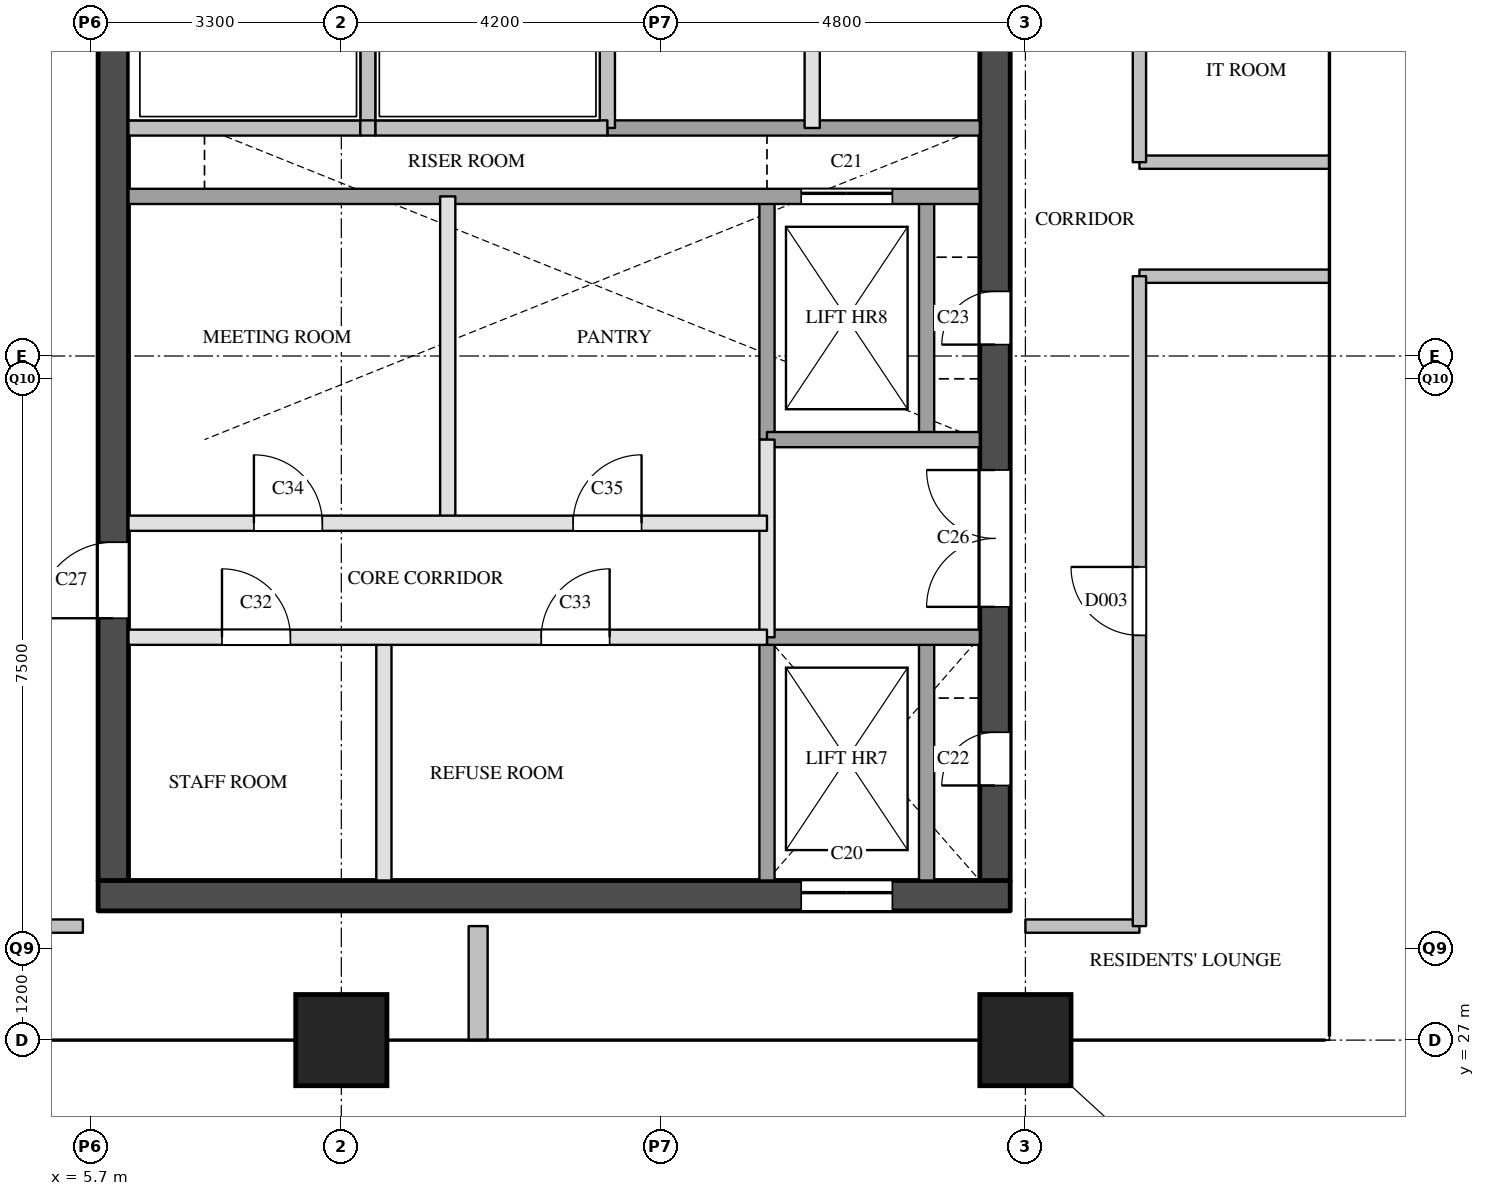
"""IFC4 building model, lengths in metres.
Left out: names, types, materials, properties, quantities, classifications, styles, units other than length and angle.
Written with IfcOpenShell. Run it as: python <this file> out.ifc"""

import sys

from ifc_helpers import new_model, si_unit, direction, frame, frame_2d, origin, origin_2d, place, context, subcontext, project, spatial, rectangle, extrude, element, fill, save


model = new_model("IFC4")
c1 = context("Model", 3, precision=1e-05, world=origin(), true_north=direction((0.0, 1.0)))
c2 = subcontext(c1, "Body", "Model", "MODEL_VIEW")
j1 = project(units=[si_unit("LENGTHUNIT", "METRE"), si_unit("PLANEANGLEUNIT", "RADIAN")], contexts=[c1])
p1 = place(None, origin())
s1 = spatial("IfcSite", under=j1, at=p1, CompositionType="ELEMENT")
p2 = place(p1, origin())
s2 = spatial("IfcBuilding", under=s1, at=p2, CompositionType="ELEMENT")
p3 = place(p2, frame((0.0, 0.0, 207.2)))
s3 = spatial("IfcBuildingStorey", under=s2, at=p3, CompositionType="ELEMENT", Elevation=207.2)
for number, where, z_axis, x_axis in (
    (1, (9.0, 27.0, 0.0), (0.0, 0.0, 1.0), (1.0, 0.0, 0.0)),
    (2, (18.0, 27.0, 0.0), (0.0, 0.0, 1.0), (1.0, 0.0, 0.0)),
):
    element("IfcColumn", number, at=place(p3, frame(where, z_axis=z_axis, x_axis=x_axis)), inside=s3, PredefinedType="COLUMN", context=c2, shape_type="SweptSolid", body=[
        extrude(rectangle(XDim=1.2, YDim=1.2, at=origin_2d()), origin(), (0.0, 0.0, 1.0), 3.9),
    ])
p4 = place(p3, frame((5.8, 28.9, 0.0), z_axis=(0.0, 0.0, 1.0), x_axis=(1.0, 0.0, 0.0)))
e3 = element("IfcWall", 3, at=p4, inside=s3, PredefinedType="SHEAR", context=c2, shape_type="SweptSolid", body=[
    extrude(rectangle(XDim=12.0, YDim=0.4, at=frame_2d((6.0, 0.0))), origin(), (0.0, 0.0, 1.0), 3.6),
])
p5 = place(p4, frame((9.25, 0.0, 0.0)))
e4 = element("IfcOpeningElement", 4, at=p5, cuts=e3, PredefinedType="OPENING", context=c2, shape_type="SweptSolid", body=[
    extrude(rectangle(XDim=1.2, YDim=2.1, at=frame_2d((0.6, 1.05))), frame((0.0, 0.21, 0.0), z_axis=(0.0, -1.0, 0.0), x_axis=(1.0, 0.0, 0.0)), (0.0, 0.0, 1.0), 0.42),
])
p6 = place(p3, frame((6.0, 29.1, 0.0), z_axis=(0.0, 0.0, 1.0), x_axis=(0.0, 1.0, 0.0)))
e5 = element("IfcWall", 5, at=p6, inside=s3, PredefinedType="SHEAR", context=c2, shape_type="SweptSolid", body=[
    extrude(rectangle(XDim=20.3, YDim=0.4, at=frame_2d((10.15, 0.0))), origin(), (0.0, 0.0, 1.0), 3.6),
])
p7 = place(p6, frame((3.45, 0.0, 0.0)))
e6 = element("IfcOpeningElement", 6, at=p7, cuts=e5, PredefinedType="OPENING", context=c2, shape_type="SweptSolid", body=[
    extrude(rectangle(XDim=1.0, YDim=2.1, at=frame_2d((0.5, 1.05))), frame((0.0, 0.21, 0.0), z_axis=(0.0, -1.0, 0.0), x_axis=(1.0, 0.0, 0.0)), (0.0, 0.0, 1.0), 0.42),
])
p8 = place(p6, frame((16.4, 0.0, 0.0)))
e7 = element("IfcOpeningElement", 7, at=p8, cuts=e5, PredefinedType="OPENING", context=c2, shape_type="SweptSolid", body=[
    extrude(rectangle(XDim=1.0, YDim=2.1, at=frame_2d((0.5, 1.05))), frame((0.0, 0.21, 0.0), z_axis=(0.0, -1.0, 0.0), x_axis=(1.0, 0.0, 0.0)), (0.0, 0.0, 1.0), 0.42),
])
p9 = place(p3, frame((17.6, 29.1, 0.0), z_axis=(0.0, 0.0, 1.0), x_axis=(0.0, 1.0, 0.0)))
e8 = element("IfcWall", 8, at=p9, inside=s3, PredefinedType="SHEAR", context=c2, shape_type="SweptSolid", body=[
    extrude(rectangle(XDim=20.3, YDim=0.4, at=frame_2d((10.15, 0.0))), origin(), (0.0, 0.0, 1.0), 3.6),
])
p10 = place(p9, frame((1.25, 0.0, 0.0)))
e9 = element("IfcOpeningElement", 9, at=p10, cuts=e8, PredefinedType="OPENING", context=c2, shape_type="SweptSolid", body=[
    extrude(rectangle(XDim=0.7, YDim=2.1, at=frame_2d((0.35, 1.05))), frame((0.0, 0.21, 0.0), z_axis=(0.0, -1.0, 0.0), x_axis=(1.0, 0.0, 0.0)), (0.0, 0.0, 1.0), 0.42),
])
p11 = place(p9, frame((7.05, 0.0, 0.0)))
e10 = element("IfcOpeningElement", 10, at=p11, cuts=e8, PredefinedType="OPENING", context=c2, shape_type="SweptSolid", body=[
    extrude(rectangle(XDim=0.7, YDim=2.1, at=frame_2d((0.35, 1.05))), frame((0.0, 0.21, 0.0), z_axis=(0.0, -1.0, 0.0), x_axis=(1.0, 0.0, 0.0)), (0.0, 0.0, 1.0), 0.42),
])
p12 = place(p9, frame((3.6, 0.0, 0.0)))
e11 = element("IfcOpeningElement", 11, at=p12, cuts=e8, PredefinedType="OPENING", context=c2, shape_type="SweptSolid", body=[
    extrude(rectangle(XDim=1.8, YDim=2.1, at=frame_2d((0.9, 1.05))), frame((0.0, 0.21, 0.0), z_axis=(0.0, -1.0, 0.0), x_axis=(1.0, 0.0, 0.0)), (0.0, 0.0, 1.0), 0.42),
])
p13 = place(p3, frame((9.35, 39.0, 0.0), z_axis=(0.0, 0.0, 1.0), x_axis=(0.0, 1.0, 0.0)))
e12 = element("IfcWall", 12, at=p13, inside=s3, PredefinedType="SOLIDWALL", context=c2, shape_type="SweptSolid", body=[
    extrude(rectangle(XDim=1.9, YDim=0.2, at=frame_2d((0.95, 0.0))), origin(), (0.0, 0.0, 1.0), 3.6),
])
p14 = place(p3, frame((9.56, 29.1, 0.0), z_axis=(0.0, 0.0, 1.0), x_axis=(0.0, 1.0, 0.0)))
e13 = element("IfcWall", 13, at=p14, inside=s3, PredefinedType="PARTITIONING", context=c2, shape_type="SweptSolid", body=[
    extrude(rectangle(XDim=3.2, YDim=0.2, at=frame_2d((1.6, 0.0))), origin(), (0.0, 0.0, 1.0), 3.6),
])
p15 = place(p3, frame((10.4, 33.8, 0.0), z_axis=(0.0, 0.0, 1.0), x_axis=(0.0, 1.0, 0.0)))
e14 = element("IfcWall", 14, at=p15, inside=s3, PredefinedType="PARTITIONING", context=c2, shape_type="SweptSolid", body=[
    extrude(rectangle(XDim=4.3, YDim=0.2, at=frame_2d((2.15, 0.0))), origin(), (0.0, 0.0, 1.0), 3.6),
])
p16 = place(p3, frame((12.5, 39.0, 0.0), z_axis=(0.0, 0.0, 1.0), x_axis=(0.0, 1.0, 0.0)))
e15 = element("IfcWall", 15, at=p16, inside=s3, PredefinedType="SOLIDWALL", context=c2, shape_type="SweptSolid", body=[
    extrude(rectangle(XDim=1.9, YDim=0.2, at=frame_2d((0.95, 0.0))), origin(), (0.0, 0.0, 1.0), 3.6),
])
p17 = place(p3, frame((14.6, 32.3, 0.0), z_axis=(0.0, 0.0, 1.0), x_axis=(0.0, 1.0, 0.0)))
e16 = element("IfcWall", 16, at=p17, inside=s3, PredefinedType="PARTITIONING", context=c2, shape_type="SweptSolid", body=[
    extrude(rectangle(XDim=2.6, YDim=0.2, at=frame_2d((1.3, 0.0))), origin(), (0.0, 0.0, 1.0), 3.6),
])
p18 = place(p3, frame((14.6, 29.1, 0.0), z_axis=(0.0, 0.0, 1.0), x_axis=(0.0, 1.0, 0.0)))
e17 = element("IfcWall", 17, at=p18, inside=s3, PredefinedType="SOLIDWALL", context=c2, shape_type="SweptSolid", body=[
    extrude(rectangle(XDim=3.2, YDim=0.2, at=frame_2d((1.6, 0.0))), origin(), (0.0, 0.0, 1.0), 3.6),
])
p19 = place(p3, frame((14.6, 34.9, 0.0), z_axis=(0.0, 0.0, 1.0), x_axis=(0.0, 1.0, 0.0)))
e18 = element("IfcWall", 18, at=p19, inside=s3, PredefinedType="SOLIDWALL", context=c2, shape_type="SweptSolid", body=[
    extrude(rectangle(XDim=3.2, YDim=0.2, at=frame_2d((1.6, 0.0))), origin(), (0.0, 0.0, 1.0), 3.6),
])
p20 = place(p3, frame((15.195, 39.0, 0.0), z_axis=(0.0, 0.0, 1.0), x_axis=(0.0, 1.0, 0.0)))
e19 = element("IfcWall", 19, at=p20, inside=s3, PredefinedType="PARTITIONING", context=c2, shape_type="SweptSolid", body=[
    extrude(rectangle(XDim=6.2, YDim=0.2, at=frame_2d((3.1, 0.0))), origin(), (0.0, 0.0, 1.0), 3.6),
])
p21 = place(p3, frame((16.7, 29.1, 0.0), z_axis=(0.0, 0.0, 1.0), x_axis=(0.0, 1.0, 0.0)))
e20 = element("IfcWall", 20, at=p21, inside=s3, PredefinedType="SOLIDWALL", context=c2, shape_type="SweptSolid", body=[
    extrude(rectangle(XDim=3.2, YDim=0.2, at=frame_2d((1.6, 0.0))), origin(), (0.0, 0.0, 1.0), 3.6),
])
p22 = place(p3, frame((16.7, 34.9, 0.0), z_axis=(0.0, 0.0, 1.0), x_axis=(0.0, 1.0, 0.0)))
e21 = element("IfcWall", 21, at=p22, inside=s3, PredefinedType="SOLIDWALL", context=c2, shape_type="SweptSolid", body=[
    extrude(rectangle(XDim=3.2, YDim=0.2, at=frame_2d((1.6, 0.0))), origin(), (0.0, 0.0, 1.0), 3.6),
])
p23 = place(p3, frame((6.2, 32.3, 0.0), z_axis=(0.0, 0.0, 1.0), x_axis=(1.0, 0.0, 0.0)))
e22 = element("IfcWall", 22, at=p23, inside=s3, PredefinedType="PARTITIONING", context=c2, shape_type="SweptSolid", body=[
    extrude(rectangle(XDim=8.4, YDim=0.2, at=frame_2d((4.2, 0.0))), origin(), (0.0, 0.0, 1.0), 3.6),
])
p24 = place(p23, frame((1.23, 0.0, 0.0)))
e23 = element("IfcOpeningElement", 23, at=p24, cuts=e22, PredefinedType="OPENING", context=c2, shape_type="SweptSolid", body=[
    extrude(rectangle(XDim=0.9, YDim=2.1, at=frame_2d((0.45, 1.05))), frame((0.0, 0.11, 0.0), z_axis=(0.0, -1.0, 0.0), x_axis=(1.0, 0.0, 0.0)), (0.0, 0.0, 1.0), 0.22),
])
p25 = place(p23, frame((5.43, 0.0, 0.0)))
e24 = element("IfcOpeningElement", 24, at=p25, cuts=e22, PredefinedType="OPENING", context=c2, shape_type="SweptSolid", body=[
    extrude(rectangle(XDim=0.9, YDim=2.1, at=frame_2d((0.45, 1.05))), frame((0.0, 0.11, 0.0), z_axis=(0.0, -1.0, 0.0), x_axis=(1.0, 0.0, 0.0)), (0.0, 0.0, 1.0), 0.22),
])
p26 = place(p3, frame((14.6, 32.3, 0.0), z_axis=(0.0, 0.0, 1.0), x_axis=(1.0, 0.0, 0.0)))
e25 = element("IfcWall", 25, at=p26, inside=s3, PredefinedType="SOLIDWALL", context=c2, shape_type="SweptSolid", body=[
    extrude(rectangle(XDim=2.8, YDim=0.2, at=frame_2d((1.4, 0.0))), origin(), (0.0, 0.0, 1.0), 3.6),
])
p27 = place(p3, frame((6.2, 33.8, 0.0), z_axis=(0.0, 0.0, 1.0), x_axis=(1.0, 0.0, 0.0)))
e26 = element("IfcWall", 26, at=p27, inside=s3, PredefinedType="PARTITIONING", context=c2, shape_type="SweptSolid", body=[
    extrude(rectangle(XDim=8.4, YDim=0.2, at=frame_2d((4.2, 0.0))), origin(), (0.0, 0.0, 1.0), 3.6),
])
p28 = place(p27, frame((1.65, 0.0, 0.0)))
e27 = element("IfcOpeningElement", 27, at=p28, cuts=e26, PredefinedType="OPENING", context=c2, shape_type="SweptSolid", body=[
    extrude(rectangle(XDim=0.9, YDim=2.1, at=frame_2d((0.45, 1.05))), frame((0.0, 0.11, 0.0), z_axis=(0.0, -1.0, 0.0), x_axis=(1.0, 0.0, 0.0)), (0.0, 0.0, 1.0), 0.22),
])
p29 = place(p27, frame((5.85, 0.0, 0.0)))
e28 = element("IfcOpeningElement", 28, at=p29, cuts=e26, PredefinedType="OPENING", context=c2, shape_type="SweptSolid", body=[
    extrude(rectangle(XDim=0.9, YDim=2.1, at=frame_2d((0.45, 1.05))), frame((0.0, 0.11, 0.0), z_axis=(0.0, -1.0, 0.0), x_axis=(1.0, 0.0, 0.0)), (0.0, 0.0, 1.0), 0.22),
])
p30 = place(p3, frame((14.6, 34.9, 0.0), z_axis=(0.0, 0.0, 1.0), x_axis=(1.0, 0.0, 0.0)))
e29 = element("IfcWall", 29, at=p30, inside=s3, PredefinedType="SOLIDWALL", context=c2, shape_type="SweptSolid", body=[
    extrude(rectangle(XDim=2.8, YDim=0.2, at=frame_2d((1.4, 0.0))), origin(), (0.0, 0.0, 1.0), 3.6),
])
p31 = place(p3, frame((6.2, 38.1, 0.0), z_axis=(0.0, 0.0, 1.0), x_axis=(1.0, 0.0, 0.0)))
e30 = element("IfcWall", 30, at=p31, inside=s3, PredefinedType="SOLIDWALL", context=c2, shape_type="SweptSolid", body=[
    extrude(rectangle(XDim=11.2, YDim=0.2, at=frame_2d((5.6, 0.0))), origin(), (0.0, 0.0, 1.0), 3.6),
])
p32 = place(p31, frame((8.85, 0.0, 0.0)))
e31 = element("IfcOpeningElement", 31, at=p32, cuts=e30, PredefinedType="OPENING", context=c2, shape_type="SweptSolid", body=[
    extrude(rectangle(XDim=1.2, YDim=2.1, at=frame_2d((0.6, 1.05))), frame((0.0, 0.11, 0.0), z_axis=(0.0, -1.0, 0.0), x_axis=(1.0, 0.0, 0.0)), (0.0, 0.0, 1.0), 0.22),
])
p33 = place(p3, frame((12.5, 39.0, 0.0), z_axis=(0.0, 0.0, 1.0), x_axis=(1.0, 0.0, 0.0)))
e32 = element("IfcWall", 32, at=p33, inside=s3, PredefinedType="SOLIDWALL", context=c2, shape_type="SweptSolid", body=[
    extrude(rectangle(XDim=4.9, YDim=0.2, at=frame_2d((2.45, 0.0))), origin(), (0.0, 0.0, 1.0), 3.6),
])
p34 = place(p3, frame((6.2, 39.0, 0.0), z_axis=(0.0, 0.0, 1.0), x_axis=(1.0, 0.0, 0.0)))
e33 = element("IfcWall", 33, at=p34, inside=s3, PredefinedType="SOLIDWALL", context=c2, shape_type="SweptSolid", body=[
    extrude(rectangle(XDim=3.05, YDim=0.2, at=frame_2d((1.525, 0.0))), origin(), (0.0, 0.0, 1.0), 3.6),
])
p35 = place(p3, frame((9.25, 39.0, 0.0), z_axis=(0.0, 0.0, 1.0), x_axis=(1.0, 0.0, 0.0)))
e34 = element("IfcWall", 34, at=p35, inside=s3, PredefinedType="SOLIDWALL", context=c2, shape_type="SweptSolid", body=[
    extrude(rectangle(XDim=0.2, YDim=0.2, at=frame_2d((0.1, 0.0))), origin(), (0.0, 0.0, 1.0), 3.6),
])
p36 = place(p3, frame((9.45, 39.0, 0.0), z_axis=(0.0, 0.0, 1.0), x_axis=(1.0, 0.0, 0.0)))
e35 = element("IfcWall", 35, at=p36, inside=s3, PredefinedType="SOLIDWALL", context=c2, shape_type="SweptSolid", body=[
    extrude(rectangle(XDim=3.05, YDim=0.2, at=frame_2d((1.525, 0.0))), origin(), (0.0, 0.0, 1.0), 3.6),
])
for number, where, z_axis, x_axis in (
    (36, (4.1, 28.5, 0.0), (0.0, 0.0, 1.0), (1.0, 0.0, 0.0)),
    (37, (18.0, 28.5, 0.0), (0.0, 0.0, 1.0), (1.0, 0.0, 0.0)),
):
    element("IfcWall", number, at=place(p3, frame(where, z_axis=z_axis, x_axis=x_axis)), inside=s3, PredefinedType="PARTITIONING", context=c2, shape_type="SweptSolid", body=[
        extrude(rectangle(XDim=1.5, YDim=0.175, at=frame_2d((0.75, 0.0))), origin(), (0.0, 0.0, 1.0), 3.6),
    ])
for number, where, z_axis, x_axis in (
    (38, (19.5, 37.05, 0.0), (0.0, 0.0, 1.0), (1.0, 0.0, 0.0)),
    (39, (19.5, 38.55, 0.0), (0.0, 0.0, 1.0), (1.0, 0.0, 0.0)),
):
    element("IfcWall", number, at=place(p3, frame(where, z_axis=z_axis, x_axis=x_axis)), inside=s3, PredefinedType="PARTITIONING", context=c2, shape_type="SweptSolid", body=[
        extrude(rectangle(XDim=2.5, YDim=0.175, at=frame_2d((1.25, 0.0))), origin(), (0.0, 0.0, 1.0), 3.6),
    ])
p37 = place(p3, frame((19.5, 28.5, 0.0), z_axis=(0.0, 0.0, 1.0), x_axis=(0.0, 1.0, 0.0)))
e40 = element("IfcWall", 40, at=p37, inside=s3, PredefinedType="PARTITIONING", context=c2, shape_type="SweptSolid", body=[
    extrude(rectangle(XDim=8.55, YDim=0.175, at=frame_2d((4.275, 0.0))), origin(), (0.0, 0.0, 1.0), 3.6),
])
p38 = place(p37, frame((3.825, 0.0, 0.0)))
e41 = element("IfcOpeningElement", 41, at=p38, cuts=e40, PredefinedType="OPENING", context=c2, shape_type="SweptSolid", body=[
    extrude(rectangle(XDim=0.9, YDim=2.1, at=frame_2d((0.45, 1.05))), frame((0.0, 0.097, 0.0), z_axis=(0.0, -1.0, 0.0), x_axis=(1.0, 0.0, 0.0)), (0.0, 0.0, 1.0), 0.195),
])
p39 = place(p3, frame((19.5, 38.55, 0.0), z_axis=(0.0, 0.0, 1.0), x_axis=(0.0, 1.0, 0.0)))
e42 = element("IfcWall", 42, at=p39, inside=s3, PredefinedType="PARTITIONING", context=c2, shape_type="SweptSolid", body=[
    extrude(rectangle(XDim=12.95, YDim=0.175, at=frame_2d((6.475, 0.0))), origin(), (0.0, 0.0, 1.0), 3.6),
])
p40 = place(p39, frame((1.825, 0.0, 0.0)))
e43 = element("IfcOpeningElement", 43, at=p40, cuts=e42, PredefinedType="OPENING", context=c2, shape_type="SweptSolid", body=[
    extrude(rectangle(XDim=1.0, YDim=2.1, at=frame_2d((0.5, 1.05))), frame((0.0, 0.097, 0.0), z_axis=(0.0, -1.0, 0.0), x_axis=(1.0, 0.0, 0.0)), (0.0, 0.0, 1.0), 0.195),
])
p41 = place(p39, frame((8.35, 0.0, 0.0)))
e44 = element("IfcOpeningElement", 44, at=p41, cuts=e42, PredefinedType="OPENING", context=c2, shape_type="SweptSolid", body=[
    extrude(rectangle(XDim=0.9, YDim=2.1, at=frame_2d((0.45, 1.05))), frame((0.0, 0.097, 0.0), z_axis=(0.0, -1.0, 0.0), x_axis=(1.0, 0.0, 0.0)), (0.0, 0.0, 1.0), 0.195),
])
p42 = place(p3, frame((10.8, 27.0, 0.0), z_axis=(0.0, 0.0, 1.0), x_axis=(0.0, 1.0, 0.0)))
e45 = element("IfcWall", 45, at=p42, inside=s3, PredefinedType="PARTITIONING", context=c2, shape_type="SweptSolid", body=[
    extrude(rectangle(XDim=1.5, YDim=0.25, at=frame_2d((0.75, 0.0))), origin(), (0.0, 0.0, 1.0), 2.6),
])
p43 = place(p5, origin())
e46 = element("IfcDoor", 46, at=p43, inside=s3, OperationType="SLIDING_TO_LEFT", PredefinedType="DOOR", context=c2, shape_type="SweptSolid", body=[
    extrude(rectangle(XDim=1.2, YDim=2.1, at=frame_2d((0.6, 1.05))), frame((0.0, 0.025, 0.0), z_axis=(0.0, -1.0, 0.0), x_axis=(1.0, 0.0, 0.0)), (0.0, 0.0, 1.0), 0.05),
])
fill(e4, e46)
p44 = place(p32, origin())
e47 = element("IfcDoor", 47, at=p44, inside=s3, OperationType="SLIDING_TO_LEFT", PredefinedType="DOOR", context=c2, shape_type="SweptSolid", body=[
    extrude(rectangle(XDim=1.2, YDim=2.1, at=frame_2d((0.6, 1.05))), frame((0.0, 0.025, 0.0), z_axis=(0.0, -1.0, 0.0), x_axis=(1.0, 0.0, 0.0)), (0.0, 0.0, 1.0), 0.05),
])
fill(e31, e47)
p45 = place(p10, origin())
e48 = element("IfcDoor", 48, at=p45, inside=s3, OperationType="SINGLE_SWING_LEFT", PredefinedType="DOOR", context=c2, shape_type="SweptSolid", body=[
    extrude(rectangle(XDim=0.7, YDim=2.1, at=frame_2d((0.35, 1.05))), frame((0.0, 0.025, 0.0), z_axis=(0.0, -1.0, 0.0), x_axis=(1.0, 0.0, 0.0)), (0.0, 0.0, 1.0), 0.05),
])
fill(e9, e48)
p46 = place(p11, origin())
e49 = element("IfcDoor", 49, at=p46, inside=s3, OperationType="SINGLE_SWING_LEFT", PredefinedType="DOOR", context=c2, shape_type="SweptSolid", body=[
    extrude(rectangle(XDim=0.7, YDim=2.1, at=frame_2d((0.35, 1.05))), frame((0.0, 0.025, 0.0), z_axis=(0.0, -1.0, 0.0), x_axis=(1.0, 0.0, 0.0)), (0.0, 0.0, 1.0), 0.05),
])
fill(e10, e49)
p47 = place(p12, origin())
e50 = element("IfcDoor", 50, at=p47, inside=s3, OperationType="DOUBLE_DOOR_SINGLE_SWING", PredefinedType="DOOR", context=c2, shape_type="SweptSolid", body=[
    extrude(rectangle(XDim=1.8, YDim=2.1, at=frame_2d((0.9, 1.05))), frame((0.0, 0.025, 0.0), z_axis=(0.0, -1.0, 0.0), x_axis=(1.0, 0.0, 0.0)), (0.0, 0.0, 1.0), 0.05),
])
fill(e11, e50)
p48 = place(p7, origin())
e51 = element("IfcDoor", 51, at=p48, inside=s3, OperationType="SINGLE_SWING_LEFT", PredefinedType="DOOR", context=c2, shape_type="SweptSolid", body=[
    extrude(rectangle(XDim=1.0, YDim=2.1, at=frame_2d((0.5, 1.05))), frame((0.0, 0.025, 0.0), z_axis=(0.0, -1.0, 0.0), x_axis=(1.0, 0.0, 0.0)), (0.0, 0.0, 1.0), 0.05),
])
fill(e6, e51)
p49 = place(p24, origin())
e52 = element("IfcDoor", 52, at=p49, inside=s3, OperationType="SINGLE_SWING_LEFT", PredefinedType="DOOR", context=c2, shape_type="SweptSolid", body=[
    extrude(rectangle(XDim=0.9, YDim=2.1, at=frame_2d((0.45, 1.05))), frame((0.0, 0.025, 0.0), z_axis=(0.0, -1.0, 0.0), x_axis=(1.0, 0.0, 0.0)), (0.0, 0.0, 1.0), 0.05),
])
fill(e23, e52)
p50 = place(p25, origin())
e53 = element("IfcDoor", 53, at=p50, inside=s3, OperationType="SINGLE_SWING_RIGHT", PredefinedType="DOOR", context=c2, shape_type="SweptSolid", body=[
    extrude(rectangle(XDim=0.9, YDim=2.1, at=frame_2d((0.45, 1.05))), frame((0.0, 0.025, 0.0), z_axis=(0.0, -1.0, 0.0), x_axis=(1.0, 0.0, 0.0)), (0.0, 0.0, 1.0), 0.05),
])
fill(e24, e53)
p51 = place(p28, origin())
e54 = element("IfcDoor", 54, at=p51, inside=s3, OperationType="SINGLE_SWING_LEFT", PredefinedType="DOOR", context=c2, shape_type="SweptSolid", body=[
    extrude(rectangle(XDim=0.9, YDim=2.1, at=frame_2d((0.45, 1.05))), frame((0.0, 0.025, 0.0), z_axis=(0.0, -1.0, 0.0), x_axis=(1.0, 0.0, 0.0)), (0.0, 0.0, 1.0), 0.05),
])
fill(e27, e54)
p52 = place(p29, origin())
e55 = element("IfcDoor", 55, at=p52, inside=s3, OperationType="SINGLE_SWING_RIGHT", PredefinedType="DOOR", context=c2, shape_type="SweptSolid", body=[
    extrude(rectangle(XDim=0.9, YDim=2.1, at=frame_2d((0.45, 1.05))), frame((0.0, 0.025, 0.0), z_axis=(0.0, -1.0, 0.0), x_axis=(1.0, 0.0, 0.0)), (0.0, 0.0, 1.0), 0.05),
])
fill(e28, e55)
p53 = place(p38, origin())
e56 = element("IfcDoor", 56, at=p53, inside=s3, OperationType="SINGLE_SWING_RIGHT", PredefinedType="DOOR", context=c2, shape_type="SweptSolid", body=[
    extrude(rectangle(XDim=0.9, YDim=2.1, at=frame_2d((0.45, 1.05))), frame((0.0, 0.025, 0.0), z_axis=(0.0, -1.0, 0.0), x_axis=(1.0, 0.0, 0.0)), (0.0, 0.0, 1.0), 0.05),
])
fill(e41, e56)
save(model, sys.argv[1])
